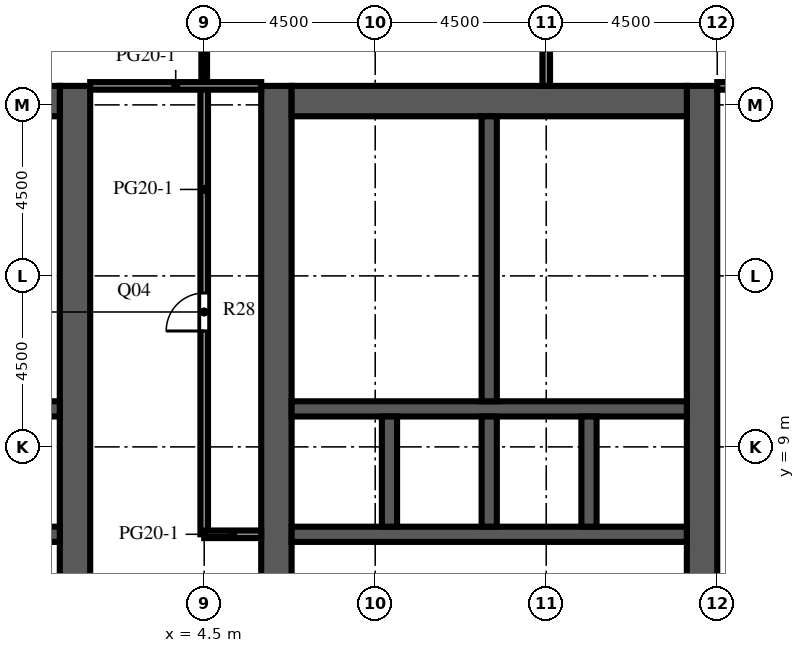
"""IFC4 building model, lengths in metres.
Left out: names, types, materials, properties, quantities, classifications, styles, units other than length and angle.
Written with IfcOpenShell. Run it as: python <this file> out.ifc"""

import sys

from ifc_helpers import new_model, si_unit, direction, frame, frame_2d, origin, place, context, subcontext, project, spatial, rectangle, extrude, element, fill, save


model = new_model("IFC4")
c1 = context("Model", 3, precision=1e-05, world=origin(), true_north=direction((0.0, 1.0)))
c2 = subcontext(c1, "Body", "Model", "MODEL_VIEW")
j1 = project(units=[si_unit("LENGTHUNIT", "METRE"), si_unit("PLANEANGLEUNIT", "RADIAN")], contexts=[c1])
p1 = place(None, origin())
s1 = spatial("IfcSite", under=j1, at=p1, CompositionType="ELEMENT")
p2 = place(p1, origin())
s2 = spatial("IfcBuilding", under=s1, at=p2, CompositionType="ELEMENT")
p3 = place(p2, frame((0.0, 0.0, 191.5)))
s3 = spatial("IfcBuildingStorey", under=s2, at=p3, CompositionType="ELEMENT", Elevation=191.5)
p4 = place(p3, frame((1.1, -9.0, 0.0), z_axis=(0.0, 0.0, 1.0), x_axis=(0.0, 1.0, 0.0)))
e1 = element("IfcWall", 1, at=p4, inside=s3, PredefinedType="SHEAR", context=c2, shape_type="SweptSolid", body=[
    extrude(rectangle(XDim=27.5, YDim=0.8, at=frame_2d((13.75, 0.0))), origin(), (0.0, 0.0, 1.0), 4.1),
])
p5 = place(p4, frame((12.55, 0.0, 0.0)))
e2 = element("IfcOpeningElement", 2, at=p5, cuts=e1, PredefinedType="OPENING", context=c2, shape_type="SweptSolid", body=[
    extrude(rectangle(XDim=2.4, YDim=2.4, at=frame_2d((1.2, 1.2))), frame((0.0, 0.41, 0.0), z_axis=(0.0, -1.0, 0.0), x_axis=(1.0, 0.0, 0.0)), (0.0, 0.0, 1.0), 0.82),
])
p6 = place(p4, frame((3.95, 0.0, 0.0)))
e3 = element("IfcOpeningElement", 3, at=p6, cuts=e1, PredefinedType="OPENING", context=c2, shape_type="SweptSolid", body=[
    extrude(rectangle(XDim=1.2, YDim=2.1, at=frame_2d((0.6, 1.05))), frame((0.0, 0.41, 0.0), z_axis=(0.0, -1.0, 0.0), x_axis=(1.0, 0.0, 0.0)), (0.0, 0.0, 1.0), 0.82),
])
p7 = place(p4, frame((19.45, 0.0, 0.0)))
e4 = element("IfcOpeningElement", 4, at=p7, cuts=e1, PredefinedType="OPENING", context=c2, shape_type="SweptSolid", body=[
    extrude(rectangle(XDim=1.0, YDim=2.1, at=frame_2d((0.5, 1.05))), frame((0.0, 0.41, 0.0), z_axis=(0.0, -1.0, 0.0), x_axis=(1.0, 0.0, 0.0)), (0.0, 0.0, 1.0), 0.82),
])
p8 = place(p4, frame((21.137, 0.0, 0.0)))
e5 = element("IfcOpeningElement", 5, at=p8, cuts=e1, PredefinedType="OPENING", context=c2, shape_type="SweptSolid", body=[
    extrude(rectangle(XDim=1.0, YDim=2.1, at=frame_2d((0.5, 1.05))), frame((0.0, 0.41, 0.0), z_axis=(0.0, -1.0, 0.0), x_axis=(1.0, 0.0, 0.0)), (0.0, 0.0, 1.0), 0.82),
])
p9 = place(p4, frame((23.2, 0.0, 0.0)))
e6 = element("IfcOpeningElement", 6, at=p9, cuts=e1, PredefinedType="OPENING", context=c2, shape_type="SweptSolid", body=[
    extrude(rectangle(XDim=1.0, YDim=2.1, at=frame_2d((0.5, 1.05))), frame((0.0, 0.41, 0.0), z_axis=(0.0, -1.0, 0.0), x_axis=(1.0, 0.0, 0.0)), (0.0, 0.0, 1.0), 0.82),
])
p10 = place(p4, frame((25.262, 0.0, 0.0)))
e7 = element("IfcOpeningElement", 7, at=p10, cuts=e1, PredefinedType="OPENING", context=c2, shape_type="SweptSolid", body=[
    extrude(rectangle(XDim=1.0, YDim=2.1, at=frame_2d((0.5, 1.05))), frame((0.0, 0.41, 0.0), z_axis=(0.0, -1.0, 0.0), x_axis=(1.0, 0.0, 0.0)), (0.0, 0.0, 1.0), 0.82),
])
p11 = place(p3, frame((-9.7, 18.1, 0.0), z_axis=(0.0, 0.0, 1.0), x_axis=(1.0, 0.0, 0.0)))
e8 = element("IfcWall", 8, at=p11, inside=s3, PredefinedType="SHEAR", context=c2, shape_type="SweptSolid", body=[
    extrude(rectangle(XDim=10.4, YDim=0.8, at=frame_2d((5.2, 0.0))), origin(), (0.0, 0.0, 1.0), 4.1),
])
p12 = place(p3, frame((-9.7, 6.7, 0.0), z_axis=(0.0, 0.0, 1.0), x_axis=(1.0, 0.0, 0.0)))
e9 = element("IfcWall", 9, at=p12, inside=s3, PredefinedType="SHEAR", context=c2, shape_type="SweptSolid", body=[
    extrude(rectangle(XDim=10.4, YDim=0.4, at=frame_2d((5.2, 0.0))), origin(), (0.0, 0.0, 1.0), 4.1),
])
p13 = place(p12, frame((3.337, 0.0, 0.0)))
e10 = element("IfcOpeningElement", 10, at=p13, cuts=e9, PredefinedType="OPENING", context=c2, shape_type="SweptSolid", body=[
    extrude(rectangle(XDim=1.1, YDim=2.1, at=frame_2d((0.55, 1.05))), frame((0.0, 0.21, 0.0), z_axis=(0.0, -1.0, 0.0), x_axis=(1.0, 0.0, 0.0)), (0.0, 0.0, 1.0), 0.42),
])
p14 = place(p12, frame((5.962, 0.0, 0.0)))
e11 = element("IfcOpeningElement", 11, at=p14, cuts=e9, PredefinedType="OPENING", context=c2, shape_type="SweptSolid", body=[
    extrude(rectangle(XDim=1.1, YDim=2.1, at=frame_2d((0.55, 1.05))), frame((0.0, 0.21, 0.0), z_axis=(0.0, -1.0, 0.0), x_axis=(1.0, 0.0, 0.0)), (0.0, 0.0, 1.0), 0.42),
])
p15 = place(p12, frame((8.663, 0.0, 0.0)))
e12 = element("IfcOpeningElement", 12, at=p15, cuts=e9, PredefinedType="OPENING", context=c2, shape_type="SweptSolid", body=[
    extrude(rectangle(XDim=1.1, YDim=2.1, at=frame_2d((0.55, 1.05))), frame((0.0, 0.21, 0.0), z_axis=(0.0, -1.0, 0.0), x_axis=(1.0, 0.0, 0.0)), (0.0, 0.0, 1.0), 0.42),
])
p16 = place(p12, frame((0.688, 0.0, 0.0)))
e13 = element("IfcOpeningElement", 13, at=p16, cuts=e9, PredefinedType="OPENING", context=c2, shape_type="SweptSolid", body=[
    extrude(rectangle(XDim=1.0, YDim=2.1, at=frame_2d((0.5, 1.05))), frame((0.0, 0.21, 0.0), z_axis=(0.0, -1.0, 0.0), x_axis=(1.0, 0.0, 0.0)), (0.0, 0.0, 1.0), 0.42),
])
p17 = place(p3, frame((-9.7, 10.0, 0.0), z_axis=(0.0, 0.0, 1.0), x_axis=(1.0, 0.0, 0.0)))
e14 = element("IfcWall", 14, at=p17, inside=s3, PredefinedType="SHEAR", context=c2, shape_type="SweptSolid", body=[
    extrude(rectangle(XDim=10.4, YDim=0.4, at=frame_2d((5.2, 0.0))), origin(), (0.0, 0.0, 1.0), 4.1),
])
p18 = place(p3, frame((6.4, -9.0, 0.0), z_axis=(0.0, 0.0, 1.0), x_axis=(0.0, 1.0, 0.0)))
e15 = element("IfcWall", 15, at=p18, inside=s3, PredefinedType="SHEAR", context=c2, shape_type="SweptSolid", body=[
    extrude(rectangle(XDim=27.5, YDim=0.8, at=frame_2d((13.75, 0.0))), origin(), (0.0, 0.0, 1.0), 4.1),
])
p19 = place(p18, frame((12.55, 0.0, 0.0)))
e16 = element("IfcOpeningElement", 16, at=p19, cuts=e15, PredefinedType="OPENING", context=c2, shape_type="SweptSolid", body=[
    extrude(rectangle(XDim=2.4, YDim=2.4, at=frame_2d((1.2, 1.2))), frame((0.0, 0.41, 0.0), z_axis=(0.0, -1.0, 0.0), x_axis=(1.0, 0.0, 0.0)), (0.0, 0.0, 1.0), 0.82),
])
p20 = place(p18, frame((3.95, 0.0, 0.0)))
e17 = element("IfcOpeningElement", 17, at=p20, cuts=e15, PredefinedType="OPENING", context=c2, shape_type="SweptSolid", body=[
    extrude(rectangle(XDim=1.2, YDim=2.1, at=frame_2d((0.6, 1.05))), frame((0.0, 0.41, 0.0), z_axis=(0.0, -1.0, 0.0), x_axis=(1.0, 0.0, 0.0)), (0.0, 0.0, 1.0), 0.82),
])
p21 = place(p18, frame((19.45, 0.0, 0.0)))
e18 = element("IfcOpeningElement", 18, at=p21, cuts=e15, PredefinedType="OPENING", context=c2, shape_type="SweptSolid", body=[
    extrude(rectangle(XDim=1.0, YDim=2.1, at=frame_2d((0.5, 1.05))), frame((0.0, 0.41, 0.0), z_axis=(0.0, -1.0, 0.0), x_axis=(1.0, 0.0, 0.0)), (0.0, 0.0, 1.0), 0.82),
])
p22 = place(p18, frame((21.137, 0.0, 0.0)))
e19 = element("IfcOpeningElement", 19, at=p22, cuts=e15, PredefinedType="OPENING", context=c2, shape_type="SweptSolid", body=[
    extrude(rectangle(XDim=1.0, YDim=2.1, at=frame_2d((0.5, 1.05))), frame((0.0, 0.41, 0.0), z_axis=(0.0, -1.0, 0.0), x_axis=(1.0, 0.0, 0.0)), (0.0, 0.0, 1.0), 0.82),
])
p23 = place(p18, frame((23.2, 0.0, 0.0)))
e20 = element("IfcOpeningElement", 20, at=p23, cuts=e15, PredefinedType="OPENING", context=c2, shape_type="SweptSolid", body=[
    extrude(rectangle(XDim=1.0, YDim=2.1, at=frame_2d((0.5, 1.05))), frame((0.0, 0.41, 0.0), z_axis=(0.0, -1.0, 0.0), x_axis=(1.0, 0.0, 0.0)), (0.0, 0.0, 1.0), 0.82),
])
p24 = place(p18, frame((25.262, 0.0, 0.0)))
e21 = element("IfcOpeningElement", 21, at=p24, cuts=e15, PredefinedType="OPENING", context=c2, shape_type="SweptSolid", body=[
    extrude(rectangle(XDim=1.0, YDim=2.1, at=frame_2d((0.5, 1.05))), frame((0.0, 0.41, 0.0), z_axis=(0.0, -1.0, 0.0), x_axis=(1.0, 0.0, 0.0)), (0.0, 0.0, 1.0), 0.82),
])
p25 = place(p3, frame((17.6, -9.0, 0.0), z_axis=(0.0, 0.0, 1.0), x_axis=(0.0, 1.0, 0.0)))
e22 = element("IfcWall", 22, at=p25, inside=s3, PredefinedType="SHEAR", context=c2, shape_type="SweptSolid", body=[
    extrude(rectangle(XDim=27.5, YDim=0.8, at=frame_2d((13.75, 0.0))), origin(), (0.0, 0.0, 1.0), 4.1),
])
p26 = place(p25, frame((12.55, 0.0, 0.0)))
e23 = element("IfcOpeningElement", 23, at=p26, cuts=e22, PredefinedType="OPENING", context=c2, shape_type="SweptSolid", body=[
    extrude(rectangle(XDim=2.4, YDim=2.4, at=frame_2d((1.2, 1.2))), frame((0.0, 0.41, 0.0), z_axis=(0.0, -1.0, 0.0), x_axis=(1.0, 0.0, 0.0)), (0.0, 0.0, 1.0), 0.82),
])
p27 = place(p25, frame((6.825, 0.0, 0.0)))
e24 = element("IfcOpeningElement", 24, at=p27, cuts=e22, PredefinedType="OPENING", context=c2, shape_type="SweptSolid", body=[
    extrude(rectangle(XDim=1.2, YDim=2.1, at=frame_2d((0.6, 1.05))), frame((0.0, 0.41, 0.0), z_axis=(0.0, -1.0, 0.0), x_axis=(1.0, 0.0, 0.0)), (0.0, 0.0, 1.0), 0.82),
])
p28 = place(p25, frame((19.475, 0.0, 0.0)))
e25 = element("IfcOpeningElement", 25, at=p28, cuts=e22, PredefinedType="OPENING", context=c2, shape_type="SweptSolid", body=[
    extrude(rectangle(XDim=1.2, YDim=2.1, at=frame_2d((0.6, 1.05))), frame((0.0, 0.41, 0.0), z_axis=(0.0, -1.0, 0.0), x_axis=(1.0, 0.0, 0.0)), (0.0, 0.0, 1.0), 0.82),
])
p29 = place(p3, frame((6.8, 18.1, 0.0), z_axis=(0.0, 0.0, 1.0), x_axis=(1.0, 0.0, 0.0)))
e26 = element("IfcWall", 26, at=p29, inside=s3, PredefinedType="SHEAR", context=c2, shape_type="SweptSolid", body=[
    extrude(rectangle(XDim=10.4, YDim=0.8, at=frame_2d((5.2, 0.0))), origin(), (0.0, 0.0, 1.0), 4.1),
])
p30 = place(p3, frame((6.8, 6.7, 0.0), z_axis=(0.0, 0.0, 1.0), x_axis=(1.0, 0.0, 0.0)))
e27 = element("IfcWall", 27, at=p30, inside=s3, PredefinedType="SHEAR", context=c2, shape_type="SweptSolid", body=[
    extrude(rectangle(XDim=10.4, YDim=0.4, at=frame_2d((5.2, 0.0))), origin(), (0.0, 0.0, 1.0), 4.1),
])
p31 = place(p30, frame((3.337, 0.0, 0.0)))
e28 = element("IfcOpeningElement", 28, at=p31, cuts=e27, PredefinedType="OPENING", context=c2, shape_type="SweptSolid", body=[
    extrude(rectangle(XDim=1.1, YDim=2.1, at=frame_2d((0.55, 1.05))), frame((0.0, 0.21, 0.0), z_axis=(0.0, -1.0, 0.0), x_axis=(1.0, 0.0, 0.0)), (0.0, 0.0, 1.0), 0.42),
])
p32 = place(p30, frame((5.962, 0.0, 0.0)))
e29 = element("IfcOpeningElement", 29, at=p32, cuts=e27, PredefinedType="OPENING", context=c2, shape_type="SweptSolid", body=[
    extrude(rectangle(XDim=1.1, YDim=2.1, at=frame_2d((0.55, 1.05))), frame((0.0, 0.21, 0.0), z_axis=(0.0, -1.0, 0.0), x_axis=(1.0, 0.0, 0.0)), (0.0, 0.0, 1.0), 0.42),
])
p33 = place(p30, frame((8.663, 0.0, 0.0)))
e30 = element("IfcOpeningElement", 30, at=p33, cuts=e27, PredefinedType="OPENING", context=c2, shape_type="SweptSolid", body=[
    extrude(rectangle(XDim=1.1, YDim=2.1, at=frame_2d((0.55, 1.05))), frame((0.0, 0.21, 0.0), z_axis=(0.0, -1.0, 0.0), x_axis=(1.0, 0.0, 0.0)), (0.0, 0.0, 1.0), 0.42),
])
p34 = place(p30, frame((0.688, 0.0, 0.0)))
e31 = element("IfcOpeningElement", 31, at=p34, cuts=e27, PredefinedType="OPENING", context=c2, shape_type="SweptSolid", body=[
    extrude(rectangle(XDim=1.0, YDim=2.1, at=frame_2d((0.5, 1.05))), frame((0.0, 0.21, 0.0), z_axis=(0.0, -1.0, 0.0), x_axis=(1.0, 0.0, 0.0)), (0.0, 0.0, 1.0), 0.42),
])
p35 = place(p3, frame((6.8, 10.0, 0.0), z_axis=(0.0, 0.0, 1.0), x_axis=(1.0, 0.0, 0.0)))
e32 = element("IfcWall", 32, at=p35, inside=s3, PredefinedType="SHEAR", context=c2, shape_type="SweptSolid", body=[
    extrude(rectangle(XDim=10.4, YDim=0.4, at=frame_2d((5.2, 0.0))), origin(), (0.0, 0.0, 1.0), 4.1),
])
for number, where, z_axis, x_axis in (
    (33, (9.375, 6.9, 0.0), (0.0, 0.0, 1.0), (0.0, 1.0, 0.0)),
    (34, (12.0, 6.9, 0.0), (0.0, 0.0, 1.0), (0.0, 1.0, 0.0)),
    (35, (14.625, 6.9, 0.0), (0.0, 0.0, 1.0), (0.0, 1.0, 0.0)),
):
    element("IfcWall", number, at=place(p3, frame(where, z_axis=z_axis, x_axis=x_axis)), inside=s3, PredefinedType="SHEAR", context=c2, shape_type="SweptSolid", body=[
        extrude(rectangle(XDim=2.9, YDim=0.4, at=frame_2d((1.45, 0.0))), origin(), (0.0, 0.0, 1.0), 4.1),
    ])
p36 = place(p3, frame((12.0, 10.2, 0.0), z_axis=(0.0, 0.0, 1.0), x_axis=(0.0, 1.0, 0.0)))
e36 = element("IfcWall", 36, at=p36, inside=s3, PredefinedType="SHEAR", context=c2, shape_type="SweptSolid", body=[
    extrude(rectangle(XDim=7.5, YDim=0.4, at=frame_2d((3.75, 0.0))), origin(), (0.0, 0.0, 1.0), 4.1),
])
for number, where, z_axis, x_axis in (
    (37, (-4.3, 11.7, 0.0), (0.0, 0.0, 1.0), (1.0, 0.0, 0.0)),
    (38, (-4.3, 13.575, 0.0), (0.0, 0.0, 1.0), (1.0, 0.0, 0.0)),
    (39, (-4.3, 15.825, 0.0), (0.0, 0.0, 1.0), (1.0, 0.0, 0.0)),
    (40, (6.8, 11.7, 0.0), (0.0, 0.0, 1.0), (1.0, 0.0, 0.0)),
    (41, (6.8, 13.575, 0.0), (0.0, 0.0, 1.0), (1.0, 0.0, 0.0)),
    (42, (6.8, 15.825, 0.0), (0.0, 0.0, 1.0), (1.0, 0.0, 0.0)),
):
    element("IfcWall", number, at=place(p3, frame(where, z_axis=z_axis, x_axis=x_axis)), inside=s3, PredefinedType="PARTITIONING", context=c2, shape_type="SweptSolid", body=[
        extrude(rectangle(XDim=5.0, YDim=0.1, at=frame_2d((2.5, 0.0))), origin(), (0.0, 0.0, 1.0), 3.65),
    ])
p37 = place(p3, frame((4.5, 26.5, 0.0), z_axis=(0.0, 0.0, 1.0), x_axis=(0.0, -1.0, 0.0)))
e43 = element("IfcWall", 43, at=p37, inside=s3, PredefinedType="PARTITIONING", context=c2, shape_type="SweptSolid", body=[
    extrude(rectangle(XDim=8.0, YDim=0.15, at=frame_2d((4.0, 0.0))), origin(), (0.0, 0.0, 1.0), 3.65),
])
p38 = place(p37, frame((3.15, 0.0, 0.0)))
e44 = element("IfcOpeningElement", 44, at=p38, cuts=e43, PredefinedType="OPENING", context=c2, shape_type="SweptSolid", body=[
    extrude(rectangle(XDim=1.0, YDim=2.1, at=frame_2d((0.5, 1.05))), frame((0.0, 0.085, 0.0), z_axis=(0.0, -1.0, 0.0), x_axis=(1.0, 0.0, 0.0)), (0.0, 0.0, 1.0), 0.17),
])
p39 = place(p3, frame((4.5, 18.5, 0.0), z_axis=(0.0, 0.0, 1.0), x_axis=(0.0, -1.0, 0.0)))
e45 = element("IfcWall", 45, at=p39, inside=s3, PredefinedType="PARTITIONING", context=c2, shape_type="SweptSolid", body=[
    extrude(rectangle(XDim=11.8, YDim=0.2, at=frame_2d((5.9, 0.0))), origin(), (0.0, 0.0, 1.0), 3.65),
])
p40 = place(p39, frame((5.45, 0.0, 0.0)))
e46 = element("IfcOpeningElement", 46, at=p40, cuts=e45, PredefinedType="OPENING", context=c2, shape_type="SweptSolid", body=[
    extrude(rectangle(XDim=1.0, YDim=2.1, at=frame_2d((0.5, 1.05))), frame((0.0, 0.11, 0.0), z_axis=(0.0, -1.0, 0.0), x_axis=(1.0, 0.0, 0.0)), (0.0, 0.0, 1.0), 0.22),
])
p41 = place(p3, frame((13.5, 18.5, 0.0), z_axis=(0.0, 0.0, 1.0), x_axis=(0.0, 1.0, 0.0)))
e47 = element("IfcWall", 47, at=p41, inside=s3, PredefinedType="PARTITIONING", context=c2, shape_type="SweptSolid", body=[
    extrude(rectangle(XDim=8.0, YDim=0.2, at=frame_2d((4.0, 0.0))), origin(), (0.0, 0.0, 1.0), 3.65),
])
p42 = place(p3, frame((4.5, 6.7, 0.0), z_axis=(0.0, 0.0, 1.0), x_axis=(1.0, 0.0, 0.0)))
e48 = element("IfcWall", 48, at=p42, inside=s3, PredefinedType="PARTITIONING", context=c2, shape_type="SweptSolid", body=[
    extrude(rectangle(XDim=1.5, YDim=0.2, at=frame_2d((0.75, 0.0))), origin(), (0.0, 0.0, 1.0), 3.65),
])
p43 = place(p3, frame((1.5, 18.5, 0.0), z_axis=(0.0, 0.0, 1.0), x_axis=(1.0, 0.0, 0.0)))
e49 = element("IfcWall", 49, at=p43, inside=s3, PredefinedType="PARTITIONING", context=c2, shape_type="SweptSolid", body=[
    extrude(rectangle(XDim=4.5, YDim=0.2, at=frame_2d((2.25, 0.0))), origin(), (0.0, 0.0, 1.0), 3.65),
])
p44 = place(p3, frame((18.0, 18.5, 0.0), z_axis=(0.0, 0.0, 1.0), x_axis=(1.0, 0.0, 0.0)))
e50 = element("IfcWall", 50, at=p44, inside=s3, PredefinedType="PARTITIONING", context=c2, shape_type="SweptSolid", body=[
    extrude(rectangle(XDim=3.0, YDim=0.2, at=frame_2d((1.5, 0.0))), origin(), (0.0, 0.0, 1.0), 3.65),
])
p45 = place(p31, origin())
e51 = element("IfcDoor", 51, at=p45, inside=s3, OperationType="DOUBLE_DOOR_SLIDING", PredefinedType="DOOR", context=c2, shape_type="SweptSolid", body=[
    extrude(rectangle(XDim=1.1, YDim=2.1, at=frame_2d((0.55, 1.05))), frame((0.0, 0.025, 0.0), z_axis=(0.0, -1.0, 0.0), x_axis=(1.0, 0.0, 0.0)), (0.0, 0.0, 1.0), 0.05),
])
fill(e28, e51)
p46 = place(p32, origin())
e52 = element("IfcDoor", 52, at=p46, inside=s3, OperationType="DOUBLE_DOOR_SLIDING", PredefinedType="DOOR", context=c2, shape_type="SweptSolid", body=[
    extrude(rectangle(XDim=1.1, YDim=2.1, at=frame_2d((0.55, 1.05))), frame((0.0, 0.025, 0.0), z_axis=(0.0, -1.0, 0.0), x_axis=(1.0, 0.0, 0.0)), (0.0, 0.0, 1.0), 0.05),
])
fill(e29, e52)
p47 = place(p33, origin())
e53 = element("IfcDoor", 53, at=p47, inside=s3, OperationType="DOUBLE_DOOR_SLIDING", PredefinedType="DOOR", context=c2, shape_type="SweptSolid", body=[
    extrude(rectangle(XDim=1.1, YDim=2.1, at=frame_2d((0.55, 1.05))), frame((0.0, 0.025, 0.0), z_axis=(0.0, -1.0, 0.0), x_axis=(1.0, 0.0, 0.0)), (0.0, 0.0, 1.0), 0.05),
])
fill(e30, e53)
p48 = place(p5, origin())
e54 = element("IfcDoor", 54, at=p48, inside=s3, OperationType="DOUBLE_DOOR_DOUBLE_SWING", PredefinedType="DOOR", context=c2, shape_type="SweptSolid", body=[
    extrude(rectangle(XDim=2.4, YDim=2.4, at=frame_2d((1.2, 1.2))), frame((0.0, 0.025, 0.0), z_axis=(0.0, -1.0, 0.0), x_axis=(1.0, 0.0, 0.0)), (0.0, 0.0, 1.0), 0.05),
])
fill(e2, e54)
p49 = place(p19, origin())
e55 = element("IfcDoor", 55, at=p49, inside=s3, OperationType="DOUBLE_DOOR_DOUBLE_SWING", PredefinedType="DOOR", context=c2, shape_type="SweptSolid", body=[
    extrude(rectangle(XDim=2.4, YDim=2.4, at=frame_2d((1.2, 1.2))), frame((0.0, 0.025, 0.0), z_axis=(0.0, -1.0, 0.0), x_axis=(1.0, 0.0, 0.0)), (0.0, 0.0, 1.0), 0.05),
])
fill(e16, e55)
p50 = place(p26, origin())
e56 = element("IfcDoor", 56, at=p50, inside=s3, OperationType="DOUBLE_DOOR_DOUBLE_SWING", PredefinedType="DOOR", context=c2, shape_type="SweptSolid", body=[
    extrude(rectangle(XDim=2.4, YDim=2.4, at=frame_2d((1.2, 1.2))), frame((0.0, 0.025, 0.0), z_axis=(0.0, -1.0, 0.0), x_axis=(1.0, 0.0, 0.0)), (0.0, 0.0, 1.0), 0.05),
])
fill(e23, e56)
p51 = place(p28, frame((1.2, 0.0, 0.0), z_axis=(0.0, 0.0, 1.0), x_axis=(-1.0, 0.0, 0.0)))
e57 = element("IfcDoor", 57, at=p51, inside=s3, OperationType="SINGLE_SWING_LEFT", PredefinedType="DOOR", context=c2, shape_type="SweptSolid", body=[
    extrude(rectangle(XDim=1.2, YDim=2.1, at=frame_2d((0.6, 1.05))), frame((0.0, 0.025, 0.0), z_axis=(0.0, -1.0, 0.0), x_axis=(1.0, 0.0, 0.0)), (0.0, 0.0, 1.0), 0.05),
])
fill(e25, e57)
p52 = place(p7, origin())
e58 = element("IfcDoor", 58, at=p52, inside=s3, OperationType="SINGLE_SWING_LEFT", PredefinedType="DOOR", context=c2, shape_type="SweptSolid", body=[
    extrude(rectangle(XDim=1.0, YDim=2.1, at=frame_2d((0.5, 1.05))), frame((0.0, 0.375, 0.0), z_axis=(0.0, -1.0, 0.0), x_axis=(1.0, 0.0, 0.0)), (0.0, 0.0, 1.0), 0.05),
])
fill(e4, e58)
p53 = place(p8, origin())
e59 = element("IfcDoor", 59, at=p53, inside=s3, OperationType="SINGLE_SWING_RIGHT", PredefinedType="DOOR", context=c2, shape_type="SweptSolid", body=[
    extrude(rectangle(XDim=1.0, YDim=2.1, at=frame_2d((0.5, 1.05))), frame((0.0, 0.375, 0.0), z_axis=(0.0, -1.0, 0.0), x_axis=(1.0, 0.0, 0.0)), (0.0, 0.0, 1.0), 0.05),
])
fill(e5, e59)
p54 = place(p9, origin())
e60 = element("IfcDoor", 60, at=p54, inside=s3, OperationType="SINGLE_SWING_LEFT", PredefinedType="DOOR", context=c2, shape_type="SweptSolid", body=[
    extrude(rectangle(XDim=1.0, YDim=2.1, at=frame_2d((0.5, 1.05))), frame((0.0, 0.375, 0.0), z_axis=(0.0, -1.0, 0.0), x_axis=(1.0, 0.0, 0.0)), (0.0, 0.0, 1.0), 0.05),
])
fill(e6, e60)
p55 = place(p10, origin())
e61 = element("IfcDoor", 61, at=p55, inside=s3, OperationType="SINGLE_SWING_RIGHT", PredefinedType="DOOR", context=c2, shape_type="SweptSolid", body=[
    extrude(rectangle(XDim=1.0, YDim=2.1, at=frame_2d((0.5, 1.05))), frame((0.0, 0.375, 0.0), z_axis=(0.0, -1.0, 0.0), x_axis=(1.0, 0.0, 0.0)), (0.0, 0.0, 1.0), 0.05),
])
fill(e7, e61)
p56 = place(p34, origin())
e62 = element("IfcDoor", 62, at=p56, inside=s3, OperationType="SINGLE_SWING_LEFT", PredefinedType="DOOR", context=c2, shape_type="SweptSolid", body=[
    extrude(rectangle(XDim=1.0, YDim=2.1, at=frame_2d((0.5, 1.05))), frame((0.0, 0.025, 0.0), z_axis=(0.0, -1.0, 0.0), x_axis=(1.0, 0.0, 0.0)), (0.0, 0.0, 1.0), 0.05),
])
fill(e31, e62)
p57 = place(p21, origin())
e63 = element("IfcDoor", 63, at=p57, inside=s3, OperationType="SINGLE_SWING_RIGHT", PredefinedType="DOOR", context=c2, shape_type="SweptSolid", body=[
    extrude(rectangle(XDim=1.0, YDim=2.1, at=frame_2d((0.5, 1.05))), frame((0.0, -0.325, 0.0), z_axis=(0.0, -1.0, 0.0), x_axis=(1.0, 0.0, 0.0)), (0.0, 0.0, 1.0), 0.05),
])
fill(e18, e63)
p58 = place(p22, origin())
e64 = element("IfcDoor", 64, at=p58, inside=s3, OperationType="SINGLE_SWING_LEFT", PredefinedType="DOOR", context=c2, shape_type="SweptSolid", body=[
    extrude(rectangle(XDim=1.0, YDim=2.1, at=frame_2d((0.5, 1.05))), frame((0.0, -0.325, 0.0), z_axis=(0.0, -1.0, 0.0), x_axis=(1.0, 0.0, 0.0)), (0.0, 0.0, 1.0), 0.05),
])
fill(e19, e64)
p59 = place(p23, origin())
e65 = element("IfcDoor", 65, at=p59, inside=s3, OperationType="SINGLE_SWING_RIGHT", PredefinedType="DOOR", context=c2, shape_type="SweptSolid", body=[
    extrude(rectangle(XDim=1.0, YDim=2.1, at=frame_2d((0.5, 1.05))), frame((0.0, -0.325, 0.0), z_axis=(0.0, -1.0, 0.0), x_axis=(1.0, 0.0, 0.0)), (0.0, 0.0, 1.0), 0.05),
])
fill(e20, e65)
p60 = place(p24, origin())
e66 = element("IfcDoor", 66, at=p60, inside=s3, OperationType="SINGLE_SWING_LEFT", PredefinedType="DOOR", context=c2, shape_type="SweptSolid", body=[
    extrude(rectangle(XDim=1.0, YDim=2.1, at=frame_2d((0.5, 1.05))), frame((0.0, -0.325, 0.0), z_axis=(0.0, -1.0, 0.0), x_axis=(1.0, 0.0, 0.0)), (0.0, 0.0, 1.0), 0.05),
])
fill(e21, e66)
p61 = place(p40, origin())
e67 = element("IfcDoor", 67, at=p61, inside=s3, OperationType="SINGLE_SWING_RIGHT", PredefinedType="DOOR", context=c2, shape_type="SweptSolid", body=[
    extrude(rectangle(XDim=1.0, YDim=2.1, at=frame_2d((0.5, 1.05))), frame((0.0, 0.025, 0.0), z_axis=(0.0, -1.0, 0.0), x_axis=(1.0, 0.0, 0.0)), (0.0, 0.0, 1.0), 0.05),
])
fill(e46, e67)
save(model, sys.argv[1])
